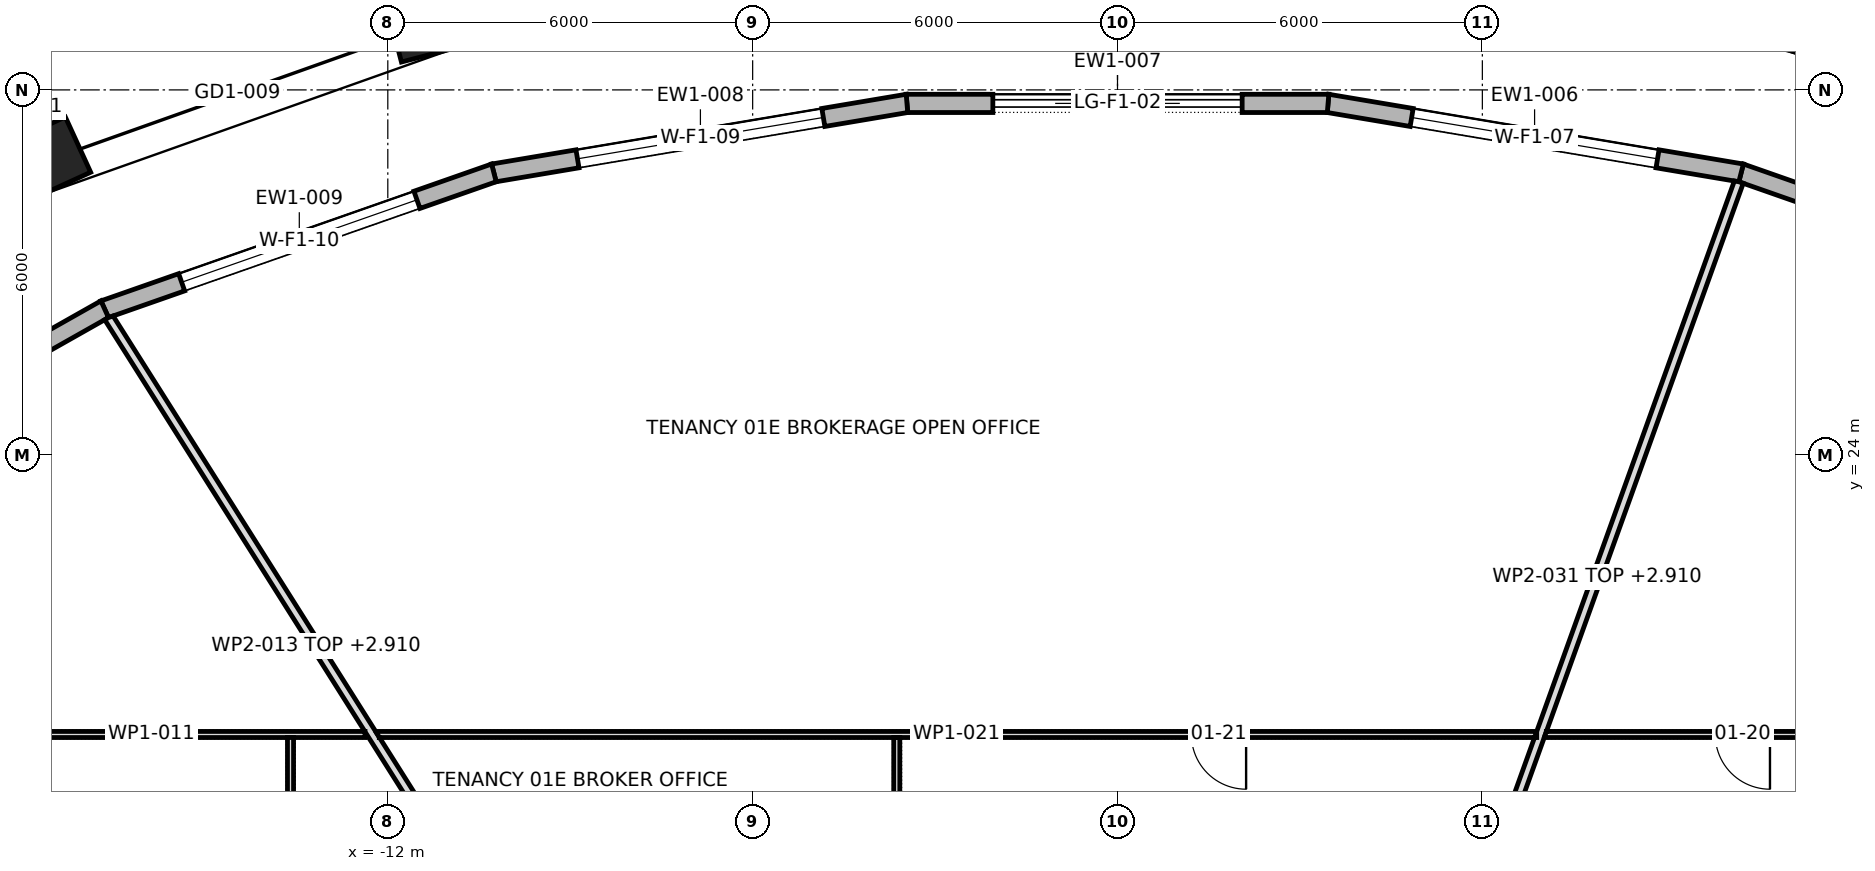
"""IFC4 building model, lengths in metres.
Left out: names, types, materials, properties, quantities, classifications, styles, units other than length and angle.
Written with IfcOpenShell. Run it as: python <this file> out.ifc"""

import sys

from ifc_helpers import new_model, si_unit, direction, frame, frame_2d, origin, origin_2d, place, context, subcontext, project, spatial, polyline, rectangle, outline, extrude, element, fill, save


model = new_model("IFC4")
c1 = context("Model", 3, precision=1e-05, world=origin(), true_north=direction((0.0, 1.0)))
c2 = subcontext(c1, "Body", "Model", "MODEL_VIEW")
j1 = project(units=[si_unit("LENGTHUNIT", "METRE"), si_unit("PLANEANGLEUNIT", "RADIAN")], contexts=[c1])
p1 = place(None, origin())
s1 = spatial("IfcSite", under=j1, at=p1, CompositionType="ELEMENT")
p2 = place(p1, origin())
s2 = spatial("IfcBuilding", under=s1, at=p2, CompositionType="ELEMENT")
p3 = place(p2, frame((0.0, 0.0, 27.7)))
s3 = spatial("IfcBuildingStorey", under=s2, at=p3, CompositionType="ELEMENT", Elevation=27.7)
for number, where, z_axis, x_axis in (
    (1, (11.031, 31.169, 0.0), (0.0, 0.0, 1.0), (-0.968, 0.252, 0.0)),
    (2, (-11.031, 31.169, 0.0), (0.0, 0.0, 1.0), (-0.968, -0.252, 0.0)),
    (3, (-17.913, 28.725, 0.0), (0.0, 0.0, 1.0), (-0.909, -0.417, 0.0)),
):
    element("IfcColumn", number, at=place(p3, frame(where, z_axis=z_axis, x_axis=x_axis)), inside=s3, PredefinedType="COLUMN", context=c2, shape_type="SweptSolid", body=[
        extrude(rectangle(XDim=1.8, YDim=1.0, at=origin_2d()), origin(), (0.0, 0.0, 1.0), 4.2),
    ])
p4 = place(p3, frame((16.656, 26.393, 0.0), z_axis=(0.0, 0.0, 1.0), x_axis=(-0.943767392455, 0.330610206947, 0.0)))
e4 = element("IfcWall", 4, at=p4, inside=s3, PredefinedType="STANDARD", context=c2, shape_type="SweptSolid", body=[
    extrude(outline(polyline([(-0.013, -0.15), (6.794, -0.15), (6.769, 0.15), (0.013, 0.15), (-0.013, -0.15)])), origin(), (0.0, 0.0, 1.0), 3.9),
])
p5 = place(p4, frame((1.341, 0.0, 0.6)))
e5 = element("IfcOpeningElement", 5, at=p5, cuts=e4, PredefinedType="OPENING", context=c2, shape_type="SweptSolid", body=[
    extrude(rectangle(XDim=4.1, YDim=2.85, at=frame_2d((2.05, 1.425))), frame((0.0, 0.162, 0.0), z_axis=(0.0, -1.0, 0.0), x_axis=(1.0, 0.0, 0.0)), (0.0, 0.0, 1.0), 0.324),
])
p6 = place(p3, frame((10.256, 28.635, 0.0), z_axis=(0.0, 0.0, 1.0), x_axis=(-0.986141805867, 0.165904607291, 0.0)))
e6 = element("IfcWall", 6, at=p6, inside=s3, PredefinedType="STANDARD", context=c2, shape_type="SweptSolid", body=[
    extrude(outline(polyline([(-0.013, -0.15), (6.901, -0.15), (6.876, 0.15), (0.013, 0.15), (-0.013, -0.15)])), origin(), (0.0, 0.0, 1.0), 3.9),
])
p7 = place(p6, frame((1.394, 0.0, 0.6)))
e7 = element("IfcOpeningElement", 7, at=p7, cuts=e6, PredefinedType="OPENING", context=c2, shape_type="SweptSolid", body=[
    extrude(rectangle(XDim=4.1, YDim=2.85, at=frame_2d((2.05, 1.425))), frame((0.0, 0.162, 0.0), z_axis=(0.0, -1.0, 0.0), x_axis=(1.0, 0.0, 0.0)), (0.0, 0.0, 1.0), 0.324),
])
p8 = place(p3, frame((3.463, 29.778, 0.0), z_axis=(0.0, 0.0, 1.0), x_axis=(-1.0, 0.0, 0.0)))
e8 = element("IfcWall", 8, at=p8, inside=s3, PredefinedType="STANDARD", context=c2, shape_type="SweptSolid", body=[
    extrude(outline(polyline([(-0.012, -0.15), (6.938, -0.15), (6.913, 0.15), (0.012, 0.15), (-0.012, -0.15)])), origin(), (0.0, 0.0, 1.0), 3.9),
])
p9 = place(p8, frame((1.413, 0.0, 0.0)))
e9 = element("IfcOpeningElement", 9, at=p9, cuts=e8, PredefinedType="OPENING", context=c2, shape_type="SweptSolid", body=[
    extrude(rectangle(XDim=4.1, YDim=3.45, at=frame_2d((2.05, 1.725))), frame((0.0, 0.162, 0.0), z_axis=(0.0, -1.0, 0.0), x_axis=(1.0, 0.0, 0.0)), (0.0, 0.0, 1.0), 0.324),
])
p10 = place(p3, frame((-3.463, 29.778, 0.0), z_axis=(0.0, 0.0, 1.0), x_axis=(-0.986141805867, -0.165904607291, 0.0)))
e10 = element("IfcWall", 10, at=p10, inside=s3, PredefinedType="STANDARD", context=c2, shape_type="SweptSolid", body=[
    extrude(outline(polyline([(-0.012, -0.15), (6.901, -0.15), (6.876, 0.15), (0.012, 0.15), (-0.012, -0.15)])), origin(), (0.0, 0.0, 1.0), 3.9),
])
p11 = place(p10, frame((1.394, 0.0, 0.6)))
e11 = element("IfcOpeningElement", 11, at=p11, cuts=e10, PredefinedType="OPENING", context=c2, shape_type="SweptSolid", body=[
    extrude(rectangle(XDim=4.1, YDim=2.85, at=frame_2d((2.05, 1.425))), frame((0.0, 0.162, 0.0), z_axis=(0.0, -1.0, 0.0), x_axis=(1.0, 0.0, 0.0)), (0.0, 0.0, 1.0), 0.324),
])
p12 = place(p3, frame((-10.256, 28.635, 0.0), z_axis=(0.0, 0.0, 1.0), x_axis=(-0.943767392455, -0.330610206947, 0.0)))
e12 = element("IfcWall", 12, at=p12, inside=s3, PredefinedType="STANDARD", context=c2, shape_type="SweptSolid", body=[
    extrude(outline(polyline([(-0.013, -0.15), (6.795, -0.15), (6.768, 0.15), (0.013, 0.15), (-0.013, -0.15)])), origin(), (0.0, 0.0, 1.0), 3.9),
])
p13 = place(p12, frame((1.341, 0.0, 0.6)))
e13 = element("IfcOpeningElement", 13, at=p13, cuts=e12, PredefinedType="OPENING", context=c2, shape_type="SweptSolid", body=[
    extrude(rectangle(XDim=4.1, YDim=2.85, at=frame_2d((2.05, 1.425))), frame((0.0, 0.162, 0.0), z_axis=(0.0, -1.0, 0.0), x_axis=(1.0, 0.0, 0.0)), (0.0, 0.0, 1.0), 0.324),
])
p14 = place(p3, frame((-16.656, 26.393, 0.0), z_axis=(0.0, 0.0, 1.0), x_axis=(-0.8705786416, -0.492029296678, 0.0)))
e14 = element("IfcWall", 14, at=p14, inside=s3, PredefinedType="STANDARD", context=c2, shape_type="SweptSolid", body=[
    extrude(outline(polyline([(-0.013, -0.15), (6.632, -0.15), (6.604, 0.15), (0.013, 0.15), (-0.013, -0.15)])), origin(), (0.0, 0.0, 1.0), 3.9),
])
p15 = place(p14, frame((1.259, 0.0, 0.6)))
e15 = element("IfcOpeningElement", 15, at=p15, cuts=e14, PredefinedType="OPENING", context=c2, shape_type="SweptSolid", body=[
    extrude(rectangle(XDim=4.1, YDim=2.85, at=frame_2d((2.05, 1.425))), frame((0.0, 0.162, 0.0), z_axis=(0.0, -1.0, 0.0), x_axis=(1.0, 0.0, 0.0)), (0.0, 0.0, 1.0), 0.324),
])
p16 = place(p3, frame((-19.45, 19.4, 0.0), z_axis=(0.0, 0.0, 1.0), x_axis=(1.0, 0.0, 0.0)))
e16 = element("IfcWall", 16, at=p16, inside=s3, PredefinedType="PARTITIONING", context=c2, shape_type="SweptSolid", body=[
    extrude(outline(polyline([(7.075, 0.05), (5.306, 0.05), (3.538, 0.05), (1.769, 0.05), (0.0, 0.05), (0.1, -0.05), (1.844, -0.05), (3.587, -0.05), (5.331, -0.05), (7.075, -0.05), (7.075, 0.05)])), origin(), (0.0, 0.0, 1.0), 3.9),
])
p17 = place(p3, frame((-16.592, 26.26, 0.0), z_axis=(0.0, 0.0, 1.0), x_axis=(0.534158681269, -0.845384234077, 0.0)))
e17 = element("IfcWall", 17, at=p17, inside=s3, PredefinedType="PARTITIONING", context=c2, shape_type="SweptSolid", body=[
    extrude(outline(polyline([(0.0, -0.075), (1.602, -0.075), (3.204, -0.075), (4.805, -0.075), (6.407, -0.075), (8.009, -0.075), (8.01, -0.073), (8.014, -0.075), (9.585, -0.075), (11.157, -0.075), (12.729, -0.075), (12.782, 0.01), (12.782, 0.01), (12.796, 0.032), (12.783, 0.04), (12.805, 0.075), (12.805, 0.075), (11.278, 0.075), (9.75, 0.075), (8.222, 0.075), (8.22, 0.073), (8.217, 0.075), (6.577, 0.075), (4.938, 0.075), (3.299, 0.075), (1.66, 0.075), (0.021, 0.075), (0.003, -0.003), (0.0, -0.07), (0.0, -0.075)])), origin(), (0.0, 0.0, 1.0), 2.91),
])
p18 = place(p3, frame((-13.6, 19.35, 0.0), z_axis=(0.0, 0.0, 1.0), x_axis=(0.0, -1.0, 0.0)))
e18 = element("IfcWall", 18, at=p18, inside=s3, PredefinedType="PARTITIONING", context=c2, shape_type="SweptSolid", body=[
    extrude(outline(polyline([(0.0, -0.05), (1.938, -0.05), (3.875, -0.05), (3.875, 0.0), (3.89, 0.0), (3.89, 0.05), (1.945, 0.05), (0.0, 0.05), (0.0, -0.05)])), origin(), (0.0, 0.0, 1.0), 3.9),
])
p19 = place(p3, frame((-12.2, 19.4, 0.0), z_axis=(0.0, 0.0, 1.0), x_axis=(1.0, 0.0, 0.0)))
e19 = element("IfcWall", 19, at=p19, inside=s3, PredefinedType="PARTITIONING", context=c2, shape_type="SweptSolid", body=[
    extrude(outline(polyline([(0.063, -0.05), (1.754, -0.05), (3.446, -0.05), (5.137, -0.05), (6.829, -0.05), (8.52, -0.05), (8.52, -0.05), (8.62, -0.05), (8.62, -0.05), (10.36, -0.05), (12.099, -0.05), (13.839, -0.05), (15.579, -0.05), (17.319, -0.05), (19.058, -0.05), (19.094, 0.049), (19.094, 0.05), (17.185, 0.05), (15.275, 0.05), (13.366, 0.05), (11.456, 0.05), (9.547, 0.05), (7.638, 0.05), (5.728, 0.05), (3.819, 0.05), (1.909, 0.05), (0.0, 0.05), (0.0, 0.05), (0.063, -0.05)])), origin(), (0.0, 0.0, 1.0), 3.9),
])
p20 = place(p19, frame((13.415, 0.0, 0.0)))
e20 = element("IfcOpeningElement", 20, at=p20, cuts=e19, PredefinedType="OPENING", context=c2, shape_type="SweptSolid", body=[
    extrude(rectangle(XDim=0.9, YDim=2.1, at=frame_2d((0.45, 1.05))), frame((0.0, 0.062, 0.0), z_axis=(0.0, -1.0, 0.0), x_axis=(1.0, 0.0, 0.0)), (0.0, 0.0, 1.0), 0.124),
])
p21 = place(p3, frame((-3.63, 15.475, 0.0), z_axis=(0.0, 0.0, 1.0), x_axis=(0.0, 1.0, 0.0)))
e21 = element("IfcWall", 21, at=p21, inside=s3, PredefinedType="PARTITIONING", context=c2, shape_type="SweptSolid", body=[
    extrude(rectangle(XDim=3.875, YDim=0.1, at=frame_2d((1.938, 0.0))), origin(), (0.0, 0.0, 1.0), 3.9),
])
p22 = place(p3, frame((5.538, 15.45, 0.0), z_axis=(0.0, 0.0, 1.0), x_axis=(0.337914385466, 0.94117685272, 0.0)))
e22 = element("IfcWall", 22, at=p22, inside=s3, PredefinedType="PARTITIONING", context=c2, shape_type="SweptSolid", body=[
    extrude(outline(polyline([(0.053, -0.075), (1.46, -0.075), (2.867, -0.075), (4.274, -0.075), (4.277, -0.074), (4.277, -0.075), (6.192, -0.075), (8.108, -0.075), (10.023, -0.075), (11.939, -0.075), (13.854, -0.075), (13.854, -0.063), (13.854, 0.001), (13.841, 0.075), (11.917, 0.075), (9.993, 0.075), (8.07, 0.075), (6.146, 0.075), (4.222, 0.075), (4.129, 0.042), (4.117, 0.075), (2.745, 0.075), (1.372, 0.075), (0.0, 0.075), (0.0, 0.074), (0.053, -0.075)])), origin(), (0.0, 0.0, 1.0), 2.91),
])
p23 = place(p3, frame((7.018, 19.4, 0.0), z_axis=(0.0, 0.0, 1.0), x_axis=(1.0, 0.0, 0.0)))
e23 = element("IfcWall", 23, at=p23, inside=s3, PredefinedType="PARTITIONING", context=c2, shape_type="SweptSolid", body=[
    extrude(outline(polyline([(0.0, -0.05), (1.633, -0.05), (3.266, -0.05), (4.899, -0.05), (6.532, -0.05), (6.532, -0.05), (6.632, -0.05), (6.632, -0.05), (8.532, -0.05), (10.432, -0.05), (12.332, -0.05), (12.332, -0.05), (12.432, 0.05), (10.661, 0.05), (8.89, 0.05), (7.119, 0.05), (5.348, 0.05), (3.577, 0.05), (1.807, 0.05), (0.036, 0.05), (0.0, -0.049), (0.0, -0.05)])), origin(), (0.0, 0.0, 1.0), 3.9),
])
p24 = place(p23, frame((2.812, 0.0, 0.0)))
e24 = element("IfcOpeningElement", 24, at=p24, cuts=e23, PredefinedType="OPENING", context=c2, shape_type="SweptSolid", body=[
    extrude(rectangle(XDim=0.9, YDim=2.1, at=frame_2d((0.45, 1.05))), frame((0.0, 0.062, 0.0), z_axis=(0.0, -1.0, 0.0), x_axis=(1.0, 0.0, 0.0)), (0.0, 0.0, 1.0), 0.124),
])
p25 = place(p7, origin())
e25 = element("IfcWindow", 25, at=p25, inside=s3, PartitioningType="TRIPLE_PANEL_VERTICAL", PredefinedType="WINDOW", context=c2, shape_type="SweptSolid", body=[
    extrude(rectangle(XDim=4.1, YDim=2.85, at=frame_2d((2.05, 1.425))), frame((0.0, 0.03, 0.0), z_axis=(0.0, -1.0, 0.0), x_axis=(1.0, 0.0, 0.0)), (0.0, 0.0, 1.0), 0.06),
])
fill(e7, e25)
p26 = place(p9, origin())
e26 = element("IfcDoor", 26, at=p26, inside=s3, OperationType="DOUBLE_DOOR_SLIDING", PredefinedType="DOOR", context=c2, shape_type="SweptSolid", body=[
    extrude(rectangle(XDim=4.1, YDim=3.45, at=frame_2d((2.05, 1.725))), frame((0.0, 0.025, 0.0), z_axis=(0.0, -1.0, 0.0), x_axis=(1.0, 0.0, 0.0)), (0.0, 0.0, 1.0), 0.05),
])
fill(e9, e26)
p27 = place(p11, origin())
e27 = element("IfcWindow", 27, at=p27, inside=s3, PartitioningType="TRIPLE_PANEL_VERTICAL", PredefinedType="WINDOW", context=c2, shape_type="SweptSolid", body=[
    extrude(rectangle(XDim=4.1, YDim=2.85, at=frame_2d((2.05, 1.425))), frame((0.0, 0.03, 0.0), z_axis=(0.0, -1.0, 0.0), x_axis=(1.0, 0.0, 0.0)), (0.0, 0.0, 1.0), 0.06),
])
fill(e11, e27)
p28 = place(p13, origin())
e28 = element("IfcWindow", 28, at=p28, inside=s3, PartitioningType="TRIPLE_PANEL_VERTICAL", PredefinedType="WINDOW", context=c2, shape_type="SweptSolid", body=[
    extrude(rectangle(XDim=4.1, YDim=2.85, at=frame_2d((2.05, 1.425))), frame((0.0, 0.03, 0.0), z_axis=(0.0, -1.0, 0.0), x_axis=(1.0, 0.0, 0.0)), (0.0, 0.0, 1.0), 0.06),
])
fill(e13, e28)
p29 = place(p24, frame((0.9, 0.0, 0.0), z_axis=(0.0, 0.0, 1.0), x_axis=(-1.0, 0.0, 0.0)))
e29 = element("IfcDoor", 29, at=p29, inside=s3, OperationType="SINGLE_SWING_RIGHT", PredefinedType="DOOR", context=c2, shape_type="SweptSolid", body=[
    extrude(rectangle(XDim=0.9, YDim=2.1, at=frame_2d((0.45, 1.05))), frame((0.0, 0.025, 0.0), z_axis=(0.0, -1.0, 0.0), x_axis=(1.0, 0.0, 0.0)), (0.0, 0.0, 1.0), 0.05),
])
fill(e24, e29)
p30 = place(p20, frame((0.9, 0.0, 0.0), z_axis=(0.0, 0.0, 1.0), x_axis=(-1.0, 0.0, 0.0)))
e30 = element("IfcDoor", 30, at=p30, inside=s3, OperationType="SINGLE_SWING_RIGHT", PredefinedType="DOOR", context=c2, shape_type="SweptSolid", body=[
    extrude(rectangle(XDim=0.9, YDim=2.1, at=frame_2d((0.45, 1.05))), frame((0.0, 0.025, 0.0), z_axis=(0.0, -1.0, 0.0), x_axis=(1.0, 0.0, 0.0)), (0.0, 0.0, 1.0), 0.05),
])
fill(e20, e30)
save(model, sys.argv[1])
